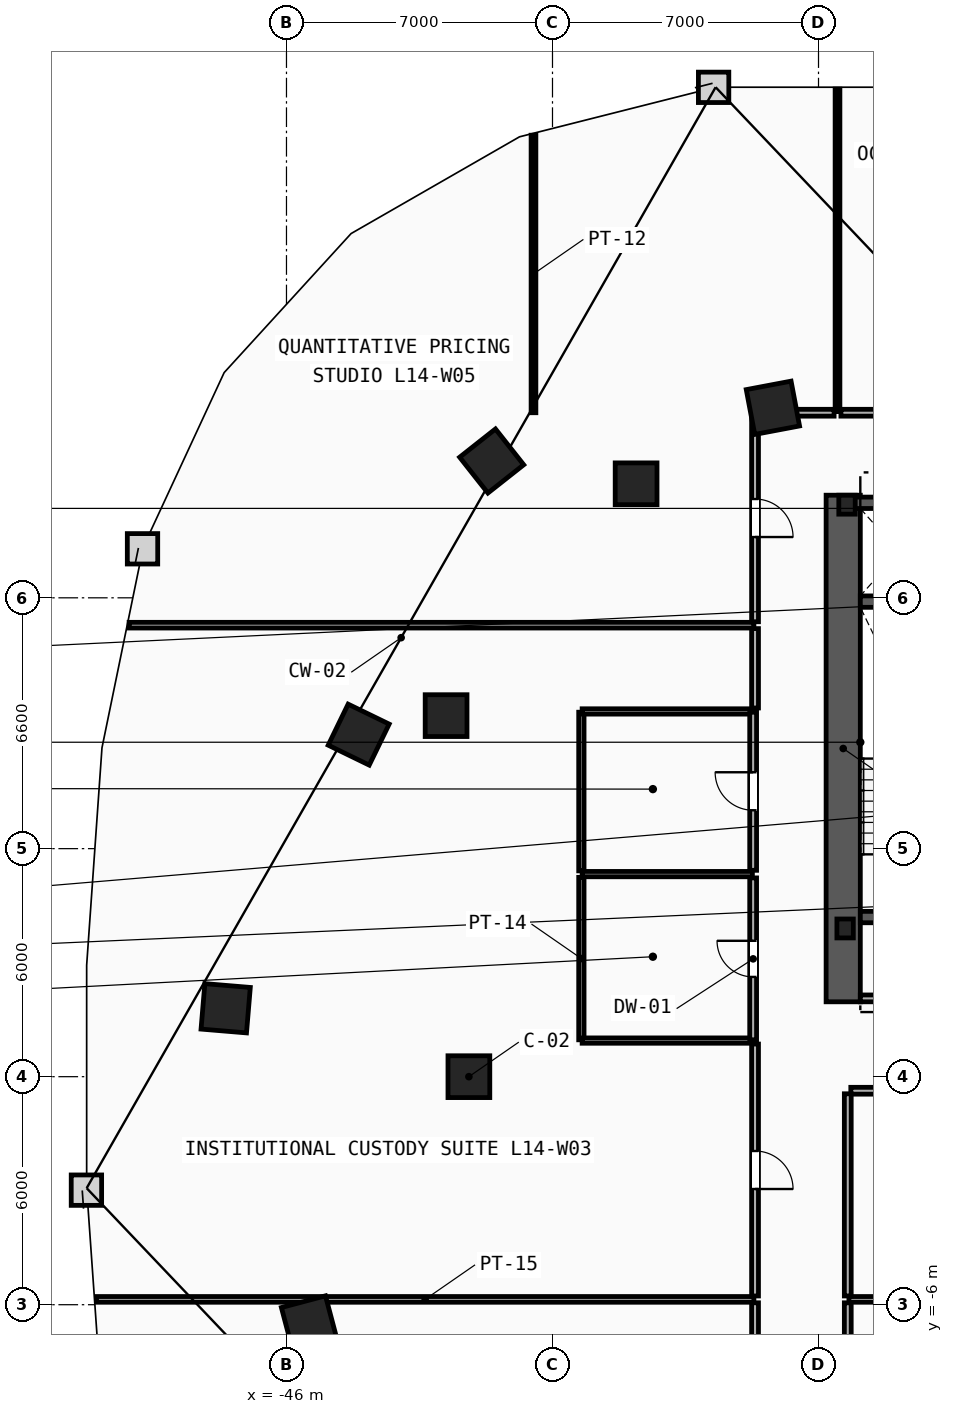
"""IFC4 building model, lengths in metres.
Left out: names, types, materials, properties, quantities, classifications, styles, units other than length and angle.
Written with IfcOpenShell. Run it as: python <this file> out.ifc"""

import sys

from ifc_helpers import new_model, si_unit, direction, frame, frame_2d, origin, origin_2d, place, context, subcontext, project, spatial, rectangle, i_section, extrude, element, fill, save


model = new_model("IFC4")
c1 = context("Model", 3, precision=1e-05, world=origin(), true_north=direction((0.0, 1.0)))
c2 = subcontext(c1, "Body", "Model", "MODEL_VIEW")
j1 = project(units=[si_unit("LENGTHUNIT", "METRE"), si_unit("PLANEANGLEUNIT", "RADIAN")], contexts=[c1])
p1 = place(None, origin())
s1 = spatial("IfcSite", under=j1, at=p1, CompositionType="ELEMENT")
p2 = place(p1, origin())
s2 = spatial("IfcBuilding", under=s1, at=p2, CompositionType="ELEMENT")
p3 = place(p2, frame((0.0, 0.0, 58.2)))
s3 = spatial("IfcBuildingStorey", under=s2, at=p3, CompositionType="ELEMENT", Elevation=58.2)
for number, where, z_axis, x_axis in (
    (1, (-31.3, 3.9, 0.0), (0.0, 0.0, 1.0), (1.0, 0.0, 0.0)),
    (2, (-31.25, 15.05, 0.0), (0.0, 0.0, 1.0), (1.0, 0.0, 0.0)),
):
    element("IfcColumn", number, at=place(p3, frame(where, z_axis=z_axis, x_axis=x_axis)), inside=s3, PredefinedType="COLUMN", context=c2, shape_type="SweptSolid", body=[
        extrude(i_section(OverallWidth=0.432, OverallDepth=0.498, WebThickness=0.056, FlangeThickness=0.089, FilletRadius=0.018, at=origin_2d()), origin(), (0.0, 0.0, 1.0), 3.8),
    ])
for number, where, z_axis, x_axis in (
    (3, (-41.2, 0.0, 0.0), (0.0, 0.0, 1.0), (1.0, 0.0, 0.0)),
    (4, (-41.8, 9.5, 0.0), (0.0, 0.0, 1.0), (1.0, 0.0, 0.0)),
    (5, (-36.8, 15.6, 0.0), (0.0, 0.0, 1.0), (1.0, 0.0, 0.0)),
):
    element("IfcColumn", number, at=place(p3, frame(where, z_axis=z_axis, x_axis=x_axis)), inside=s3, PredefinedType="COLUMN", context=c2, shape_type="SweptSolid", body=[
        extrude(rectangle(XDim=1.1, YDim=1.1, at=origin_2d()), origin(), (0.0, 0.0, 1.0), 3.8),
    ])
for number, where, z_axis, x_axis in (
    (6, (-33.2, 17.6, 0.0), (0.0, 0.0, 1.0), (-0.983, -0.186, 0.0)),
    (7, (-40.6, 16.2, 0.0), (0.0, 0.0, 1.0), (-0.785, -0.619, 0.0)),
    (8, (-44.1, 9.0, 0.0), (0.0, 0.0, 1.0), (-0.437, -0.899, 0.0)),
    (9, (-47.6, 1.8, 0.0), (0.0, 0.0, 1.0), (-0.084, -0.997, 0.0)),
    (10, (-45.4, -6.5, 0.0), (0.0, 0.0, 1.0), (0.256, -0.967, 0.0)),
):
    element("IfcColumn", number, at=place(p3, frame(where, z_axis=z_axis, x_axis=x_axis)), inside=s3, PredefinedType="COLUMN", context=c2, shape_type="SweptSolid", body=[
        extrude(rectangle(XDim=1.2, YDim=1.2, at=origin_2d()), origin(), (0.0, 0.0, 1.0), 3.8),
    ])
p4 = place(p3, frame((-31.35, 1.97, 0.0), z_axis=(0.0, 0.0, 1.0), x_axis=(0.0, 1.0, 0.0)))
e11 = element("IfcWall", 11, at=p4, inside=s3, PredefinedType="SHEAR", context=c2, shape_type="SweptSolid", body=[
    extrude(rectangle(XDim=13.33, YDim=0.9, at=frame_2d((6.665, 0.0))), origin(), (0.0, 0.0, 1.0), 3.5),
])
p5 = place(p3, frame((-30.9, 4.2, 0.0), z_axis=(0.0, 0.0, 1.0), x_axis=(1.0, 0.0, 0.0)))
e12 = element("IfcWall", 12, at=p5, inside=s3, PredefinedType="SHEAR", context=c2, shape_type="SweptSolid", body=[
    extrude(rectangle(XDim=3.16, YDim=0.3, at=frame_2d((1.58, 0.0))), origin(), (0.0, 0.0, 1.0), 3.5),
])
p6 = place(p5, frame((1.03, 0.0, 0.0)))
e13 = element("IfcOpeningElement", 13, at=p6, cuts=e12, PredefinedType="OPENING", context=c2, shape_type="SweptSolid", body=[
    extrude(rectangle(XDim=1.1, YDim=2.15, at=frame_2d((0.55, 1.075))), frame((0.0, 0.16, 0.0), z_axis=(0.0, -1.0, 0.0), x_axis=(1.0, 0.0, 0.0)), (0.0, 0.0, 1.0), 0.32),
])
p7 = place(p3, frame((-30.9, 12.5, 0.0), z_axis=(0.0, 0.0, 1.0), x_axis=(1.0, 0.0, 0.0)))
e14 = element("IfcWall", 14, at=p7, inside=s3, PredefinedType="SHEAR", context=c2, shape_type="SweptSolid", body=[
    extrude(rectangle(XDim=3.16, YDim=0.3, at=frame_2d((1.58, 0.0))), origin(), (0.0, 0.0, 1.0), 3.5),
])
p8 = place(p3, frame((-30.9, 2.06, 0.0), z_axis=(0.0, 0.0, 1.0), x_axis=(1.0, 0.0, 0.0)))
e15 = element("IfcWall", 15, at=p8, inside=s3, PredefinedType="PARTITIONING", context=c2, shape_type="SweptSolid", body=[
    extrude(rectangle(XDim=3.16, YDim=0.18, at=frame_2d((1.58, 0.0))), origin(), (0.0, 0.0, 1.0), 3.5),
])
p9 = place(p8, frame((0.98, 0.0, 0.0)))
e16 = element("IfcOpeningElement", 16, at=p9, cuts=e15, PredefinedType="OPENING", context=c2, shape_type="SweptSolid", body=[
    extrude(rectangle(XDim=1.2, YDim=2.15, at=frame_2d((0.6, 1.075))), frame((0.0, 0.1, 0.0), z_axis=(0.0, -1.0, 0.0), x_axis=(1.0, 0.0, 0.0)), (0.0, 0.0, 1.0), 0.2),
])
p10 = place(p3, frame((-31.2, 15.1, 0.0), z_axis=(0.0, 0.0, 1.0), x_axis=(1.0, 0.0, 0.0)))
e17 = element("IfcWall", 17, at=p10, inside=s3, PredefinedType="SHEAR", context=c2, shape_type="SweptSolid", body=[
    extrude(rectangle(XDim=2.5, YDim=0.3, at=frame_2d((1.25, 0.0))), origin(), (0.0, 0.0, 1.0), 3.5),
])
p11 = place(p3, frame((-38.24, 0.97, 0.0), z_axis=(0.0, 0.0, 1.0), x_axis=(0.0, 1.0, 0.0)))
e18 = element("IfcWall", 18, at=p11, inside=s3, PredefinedType="PARTITIONING", context=c2, shape_type="SweptSolid", body=[
    extrude(rectangle(XDim=4.275, YDim=0.14, at=frame_2d((2.138, 0.0))), origin(), (0.0, 0.0, 1.0), 3.5),
])
p12 = place(p3, frame((-38.24, 5.415, 0.0), z_axis=(0.0, 0.0, 1.0), x_axis=(0.0, 1.0, 0.0)))
e19 = element("IfcWall", 19, at=p12, inside=s3, PredefinedType="PARTITIONING", context=c2, shape_type="SweptSolid", body=[
    extrude(rectangle(XDim=4.175, YDim=0.14, at=frame_2d((2.087, 0.0))), origin(), (0.0, 0.0, 1.0), 3.5),
])
for number, where, z_axis, x_axis in (
    (20, (-38.22, 0.95, 0.0), (0.0, 0.0, 1.0), (1.0, 0.0, 0.0)),
    (21, (-38.22, 5.33, 0.0), (0.0, 0.0, 1.0), (1.0, 0.0, 0.0)),
    (22, (-38.22, 9.61, 0.0), (0.0, 0.0, 1.0), (1.0, 0.0, 0.0)),
):
    element("IfcWall", number, at=place(p3, frame(where, z_axis=z_axis, x_axis=x_axis)), inside=s3, PredefinedType="PARTITIONING", context=c2, shape_type="SweptSolid", body=[
        extrude(rectangle(XDim=4.48, YDim=0.14, at=frame_2d((2.24, 0.0))), origin(), (0.0, 0.0, 1.0), 3.5),
    ])
p13 = place(p3, frame((-33.72, 0.97, 0.0), z_axis=(0.0, 0.0, 1.0), x_axis=(0.0, 1.0, 0.0)))
e23 = element("IfcWall", 23, at=p13, inside=s3, PredefinedType="PARTITIONING", context=c2, shape_type="SweptSolid", body=[
    extrude(rectangle(XDim=4.26, YDim=0.18, at=frame_2d((2.13, 0.0))), origin(), (0.0, 0.0, 1.0), 3.5),
])
p14 = place(p13, frame((1.655, 0.0, 0.0)))
e24 = element("IfcOpeningElement", 24, at=p14, cuts=e23, PredefinedType="OPENING", context=c2, shape_type="SweptSolid", body=[
    extrude(rectangle(XDim=0.95, YDim=2.1, at=frame_2d((0.475, 1.05))), frame((0.0, 0.1, 0.0), z_axis=(0.0, -1.0, 0.0), x_axis=(1.0, 0.0, 0.0)), (0.0, 0.0, 1.0), 0.2),
])
p15 = place(p3, frame((-33.72, 5.43, 0.0), z_axis=(0.0, 0.0, 1.0), x_axis=(0.0, 1.0, 0.0)))
e25 = element("IfcWall", 25, at=p15, inside=s3, PredefinedType="PARTITIONING", context=c2, shape_type="SweptSolid", body=[
    extrude(rectangle(XDim=4.16, YDim=0.18, at=frame_2d((2.08, 0.0))), origin(), (0.0, 0.0, 1.0), 3.5),
])
p16 = place(p15, frame((1.58, 0.0, 0.0)))
e26 = element("IfcOpeningElement", 26, at=p16, cuts=e25, PredefinedType="OPENING", context=c2, shape_type="SweptSolid", body=[
    extrude(rectangle(XDim=1.0, YDim=2.15, at=frame_2d((0.5, 1.075))), frame((0.0, 0.1, 0.0), z_axis=(0.0, -1.0, 0.0), x_axis=(1.0, 0.0, 0.0)), (0.0, 0.0, 1.0), 0.2),
])
p17 = place(p3, frame((-51.002, -5.86, 0.0), z_axis=(0.0, 0.0, 1.0), x_axis=(1.0, 0.0, 0.0)))
e27 = element("IfcWall", 27, at=p17, inside=s3, PredefinedType="PARTITIONING", context=c2, shape_type="SweptSolid", body=[
    extrude(rectangle(XDim=17.302, YDim=0.15, at=frame_2d((8.651, 0.0))), origin(), (0.0, 0.0, 1.0), 3.5),
])
p18 = place(p3, frame((-31.2, -5.86, 0.0), z_axis=(0.0, 0.0, 1.0), x_axis=(1.0, 0.0, 0.0)))
e28 = element("IfcWall", 28, at=p18, inside=s3, PredefinedType="PARTITIONING", context=c2, shape_type="SweptSolid", body=[
    extrude(rectangle(XDim=18.202, YDim=0.15, at=frame_2d((9.101, 0.0))), origin(), (0.0, 0.0, 1.0), 3.5),
])
p19 = place(p3, frame((-50.141, 11.88, 0.0), z_axis=(0.0, 0.0, 1.0), x_axis=(1.0, 0.0, 0.0)))
e29 = element("IfcWall", 29, at=p19, inside=s3, PredefinedType="PARTITIONING", context=c2, shape_type="SweptSolid", body=[
    extrude(rectangle(XDim=16.441, YDim=0.15, at=frame_2d((8.22, 0.0))), origin(), (0.0, 0.0, 1.0), 3.5),
])
p20 = place(p3, frame((-39.5, 17.47, 0.0), z_axis=(0.0, 0.0, 1.0), x_axis=(0.0, 1.0, 0.0)))
e30 = element("IfcWall", 30, at=p20, inside=s3, PredefinedType="PARTITIONING", context=c2, shape_type="SweptSolid", body=[
    extrude(rectangle(XDim=7.302, YDim=0.125, at=frame_2d((3.651, 0.0))), origin(), (0.0, 0.0, 1.0), 3.5),
])
p21 = place(p3, frame((-31.5, 17.5, 0.0), z_axis=(0.0, 0.0, 1.0), x_axis=(0.0, 1.0, 0.0)))
e31 = element("IfcWall", 31, at=p21, inside=s3, PredefinedType="PARTITIONING", context=c2, shape_type="SweptSolid", body=[
    extrude(rectangle(XDim=8.485, YDim=0.125, at=frame_2d((4.243, 0.0))), origin(), (0.0, 0.0, 1.0), 3.5),
])
for number, where, z_axis, x_axis in (
    (32, (-33.67, -5.95, 0.0), (0.0, 0.0, 1.0), (0.0, -1.0, 0.0)),
    (33, (-31.23, -11.4, 0.0), (0.0, 0.0, 1.0), (0.0, 1.0, 0.0)),
):
    element("IfcWall", number, at=place(p3, frame(where, z_axis=z_axis, x_axis=x_axis)), inside=s3, PredefinedType="PARTITIONING", context=c2, shape_type="SweptSolid", body=[
        extrude(rectangle(XDim=5.45, YDim=0.18, at=frame_2d((2.725, 0.0))), origin(), (0.0, 0.0, 1.0), 3.5),
    ])
p22 = place(p3, frame((-33.67, 0.859, 0.0), z_axis=(0.0, 0.0, 1.0), x_axis=(0.0, -1.0, 0.0)))
e34 = element("IfcWall", 34, at=p22, inside=s3, PredefinedType="PARTITIONING", context=c2, shape_type="SweptSolid", body=[
    extrude(rectangle(XDim=6.629, YDim=0.18, at=frame_2d((3.314, 0.0))), origin(), (0.0, 0.0, 1.0), 3.5),
])
p23 = place(p22, frame((2.814, 0.0, 0.0)))
e35 = element("IfcOpeningElement", 35, at=p23, cuts=e34, PredefinedType="OPENING", context=c2, shape_type="SweptSolid", body=[
    extrude(rectangle(XDim=1.0, YDim=2.15, at=frame_2d((0.5, 1.075))), frame((0.0, 0.1, 0.0), z_axis=(0.0, -1.0, 0.0), x_axis=(1.0, 0.0, 0.0)), (0.0, 0.0, 1.0), 0.2),
])
p24 = place(p3, frame((-33.67, 11.79, 0.0), z_axis=(0.0, 0.0, 1.0), x_axis=(0.0, -1.0, 0.0)))
e36 = element("IfcWall", 36, at=p24, inside=s3, PredefinedType="PARTITIONING", context=c2, shape_type="SweptSolid", body=[
    extrude(rectangle(XDim=2.089, YDim=0.18, at=frame_2d((1.044, 0.0))), origin(), (0.0, 0.0, 1.0), 3.5),
])
p25 = place(p3, frame((-31.15, -0.37, 0.0), z_axis=(0.0, 0.0, 1.0), x_axis=(1.0, 0.0, 0.0)))
e37 = element("IfcWall", 37, at=p25, inside=s3, PredefinedType="PARTITIONING", context=c2, shape_type="SweptSolid", body=[
    extrude(rectangle(XDim=14.328, YDim=0.18, at=frame_2d((7.164, 0.0))), origin(), (0.0, 0.0, 1.0), 3.5),
])
p26 = place(p25, frame((6.664, 0.0, 0.0)))
e38 = element("IfcOpeningElement", 38, at=p26, cuts=e37, PredefinedType="OPENING", context=c2, shape_type="SweptSolid", body=[
    extrude(rectangle(XDim=1.0, YDim=2.15, at=frame_2d((0.5, 1.075))), frame((0.0, 0.1, 0.0), z_axis=(0.0, -1.0, 0.0), x_axis=(1.0, 0.0, 0.0)), (0.0, 0.0, 1.0), 0.2),
])
p27 = place(p3, frame((-31.23, -5.77, 0.0), z_axis=(0.0, 0.0, 1.0), x_axis=(0.0, 1.0, 0.0)))
e39 = element("IfcWall", 39, at=p27, inside=s3, PredefinedType="PARTITIONING", context=c2, shape_type="SweptSolid", body=[
    extrude(rectangle(XDim=5.32, YDim=0.18, at=frame_2d((2.66, 0.0))), origin(), (0.0, 0.0, 1.0), 3.5),
])
p28 = place(p3, frame((-33.67, 17.428, 0.0), z_axis=(0.0, 0.0, 1.0), x_axis=(0.0, -1.0, 0.0)))
e40 = element("IfcWall", 40, at=p28, inside=s3, PredefinedType="PARTITIONING", context=c2, shape_type="SweptSolid", body=[
    extrude(rectangle(XDim=5.458, YDim=0.18, at=frame_2d((2.729, 0.0))), origin(), (0.0, 0.0, 1.0), 3.5),
])
p29 = place(p28, frame((2.229, 0.0, 0.0)))
e41 = element("IfcOpeningElement", 41, at=p29, cuts=e40, PredefinedType="OPENING", context=c2, shape_type="SweptSolid", body=[
    extrude(rectangle(XDim=1.0, YDim=2.15, at=frame_2d((0.5, 1.075))), frame((0.0, 0.1, 0.0), z_axis=(0.0, -1.0, 0.0), x_axis=(1.0, 0.0, 0.0)), (0.0, 0.0, 1.0), 0.2),
])
p30 = place(p3, frame((-31.59, 17.47, 0.0), z_axis=(0.0, 0.0, 1.0), x_axis=(-1.0, 0.0, 0.0)))
e42 = element("IfcWall", 42, at=p30, inside=s3, PredefinedType="PARTITIONING", context=c2, shape_type="SweptSolid", body=[
    extrude(rectangle(XDim=2.038, YDim=0.18, at=frame_2d((1.019, 0.0))), origin(), (0.0, 0.0, 1.0), 3.5),
])
p31 = place(p3, frame((-24.59, 17.47, 0.0), z_axis=(0.0, 0.0, 1.0), x_axis=(-1.0, 0.0, 0.0)))
e43 = element("IfcWall", 43, at=p31, inside=s3, PredefinedType="PARTITIONING", context=c2, shape_type="SweptSolid", body=[
    extrude(rectangle(XDim=6.82, YDim=0.18, at=frame_2d((3.41, 0.0))), origin(), (0.0, 0.0, 1.0), 3.5),
])
p32 = place(p31, frame((2.91, 0.0, 0.0)))
e44 = element("IfcOpeningElement", 44, at=p32, cuts=e43, PredefinedType="OPENING", context=c2, shape_type="SweptSolid", body=[
    extrude(rectangle(XDim=1.0, YDim=2.15, at=frame_2d((0.5, 1.075))), frame((0.0, 0.1, 0.0), z_axis=(0.0, -1.0, 0.0), x_axis=(1.0, 0.0, 0.0)), (0.0, 0.0, 1.0), 0.2),
])
p33 = place(p23, origin())
e45 = element("IfcDoor", 45, at=p33, inside=s3, OperationType="SINGLE_SWING_RIGHT", PredefinedType="DOOR", context=c2, shape_type="SweptSolid", body=[
    extrude(rectangle(XDim=1.0, YDim=2.15, at=frame_2d((0.5, 1.075))), frame((0.0, 0.025, 0.0), z_axis=(0.0, -1.0, 0.0), x_axis=(1.0, 0.0, 0.0)), (0.0, 0.0, 1.0), 0.05),
])
fill(e35, e45)
p34 = place(p29, origin())
e46 = element("IfcDoor", 46, at=p34, inside=s3, OperationType="SINGLE_SWING_RIGHT", PredefinedType="DOOR", context=c2, shape_type="SweptSolid", body=[
    extrude(rectangle(XDim=1.0, YDim=2.15, at=frame_2d((0.5, 1.075))), frame((0.0, 0.025, 0.0), z_axis=(0.0, -1.0, 0.0), x_axis=(1.0, 0.0, 0.0)), (0.0, 0.0, 1.0), 0.05),
])
fill(e41, e46)
p35 = place(p14, origin())
e47 = element("IfcDoor", 47, at=p35, inside=s3, OperationType="SINGLE_SWING_RIGHT", PredefinedType="DOOR", context=c2, shape_type="SweptSolid", body=[
    extrude(rectangle(XDim=0.95, YDim=2.1, at=frame_2d((0.475, 1.05))), frame((0.0, 0.025, 0.0), z_axis=(0.0, -1.0, 0.0), x_axis=(1.0, 0.0, 0.0)), (0.0, 0.0, 1.0), 0.05),
])
fill(e24, e47)
p36 = place(p16, origin())
e48 = element("IfcDoor", 48, at=p36, inside=s3, OperationType="SINGLE_SWING_RIGHT", PredefinedType="DOOR", context=c2, shape_type="SweptSolid", body=[
    extrude(rectangle(XDim=1.0, YDim=2.15, at=frame_2d((0.5, 1.075))), frame((0.0, 0.025, 0.0), z_axis=(0.0, -1.0, 0.0), x_axis=(1.0, 0.0, 0.0)), (0.0, 0.0, 1.0), 0.05),
])
fill(e26, e48)
save(model, sys.argv[1])
